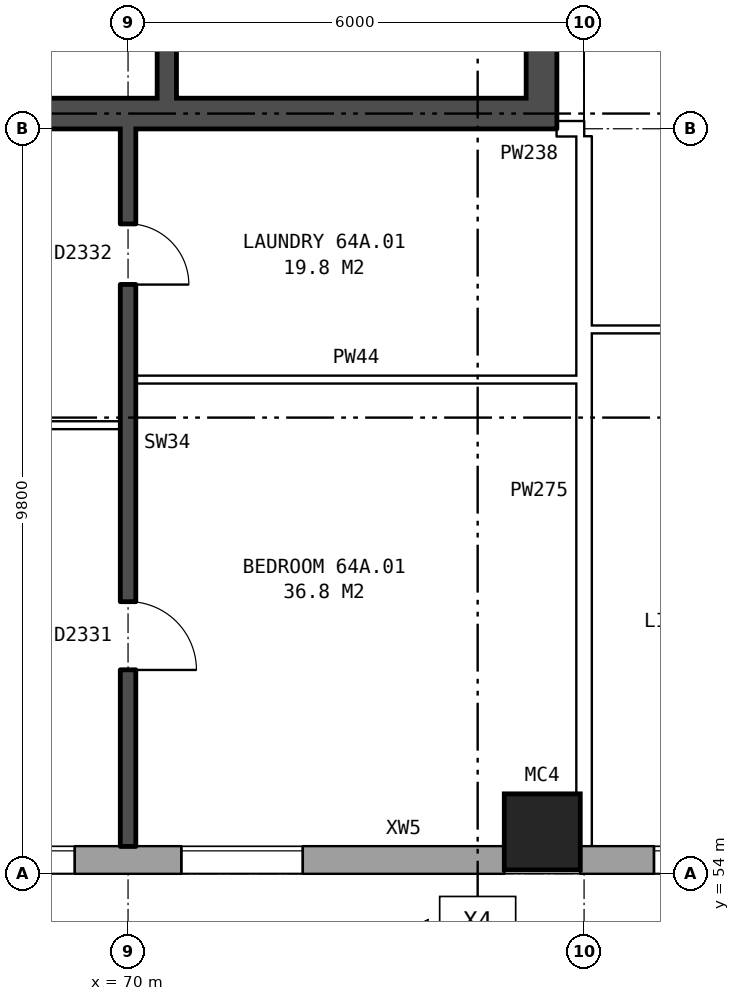
"""IFC4 building model, lengths in metres.
Left out: names, types, materials, properties, quantities, classifications, styles, units other than length and angle.
Written with IfcOpenShell. Run it as: python <this file> out.ifc"""

import sys

from ifc_helpers import new_model, si_unit, direction, frame, frame_2d, origin, origin_2d, place, context, subcontext, project, spatial, rectangle, hollow_rectangle, extrude, element, fill, save


model = new_model("IFC4")
c1 = context("Model", 3, precision=1e-05, world=origin(), true_north=direction((0.0, 1.0)))
c2 = subcontext(c1, "Body", "Model", "MODEL_VIEW")
j1 = project(units=[si_unit("LENGTHUNIT", "METRE"), si_unit("PLANEANGLEUNIT", "RADIAN")], contexts=[c1])
p1 = place(None, origin())
s1 = spatial("IfcSite", under=j1, at=p1, CompositionType="ELEMENT")
p2 = place(p1, origin())
s2 = spatial("IfcBuilding", under=s1, at=p2, CompositionType="ELEMENT")
p3 = place(p2, frame((0.0, 0.0, 227.6)))
s3 = spatial("IfcBuildingStorey", under=s2, at=p3, CompositionType="ELEMENT", Elevation=227.6)
p4 = place(p3, frame((75.45, 54.55, 0.0), z_axis=(0.0, 0.0, 1.0), x_axis=(1.0, 0.0, 0.0)))
e1 = element("IfcColumn", 1, at=p4, inside=s3, PredefinedType="COLUMN", context=c2, shape_type="SweptSolid", body=[
    extrude(hollow_rectangle(XDim=1.0, YDim=1.0, WallThickness=0.055, at=origin_2d()), origin(), (0.0, 0.0, 1.0), 3.1),
])
p5 = place(p3, frame((35.075, 54.18, 0.0), z_axis=(0.0, 0.0, 1.0), x_axis=(1.0, 0.0, 0.0)))
e2 = element("IfcWall", 2, at=p5, inside=s3, PredefinedType="STANDARD", context=c2, shape_type="SweptSolid", body=[
    extrude(rectangle(XDim=39.875, YDim=0.36, at=frame_2d((19.938, 0.0))), origin(), (0.0, 0.0, 1.0), 2.85),
])
p6 = place(p5, frame((2.625, 0.0, 0.8)))
e3 = element("IfcOpeningElement", 3, at=p6, cuts=e2, PredefinedType="OPENING", context=c2, shape_type="SweptSolid", body=[
    extrude(rectangle(XDim=1.6, YDim=1.8, at=frame_2d((0.8, 0.9))), frame((0.0, 0.19, 0.0), z_axis=(0.0, -1.0, 0.0), x_axis=(1.0, 0.0, 0.0)), (0.0, 0.0, 1.0), 0.38),
])
p7 = place(p5, frame((5.625, 0.0, 0.8)))
e4 = element("IfcOpeningElement", 4, at=p7, cuts=e2, PredefinedType="OPENING", context=c2, shape_type="SweptSolid", body=[
    extrude(rectangle(XDim=1.6, YDim=1.8, at=frame_2d((0.8, 0.9))), frame((0.0, 0.19, 0.0), z_axis=(0.0, -1.0, 0.0), x_axis=(1.0, 0.0, 0.0)), (0.0, 0.0, 1.0), 0.38),
])
p8 = place(p5, frame((8.625, 0.0, 0.8)))
e5 = element("IfcOpeningElement", 5, at=p8, cuts=e2, PredefinedType="OPENING", context=c2, shape_type="SweptSolid", body=[
    extrude(rectangle(XDim=1.6, YDim=1.8, at=frame_2d((0.8, 0.9))), frame((0.0, 0.19, 0.0), z_axis=(0.0, -1.0, 0.0), x_axis=(1.0, 0.0, 0.0)), (0.0, 0.0, 1.0), 0.38),
])
p9 = place(p5, frame((11.625, 0.0, 0.8)))
e6 = element("IfcOpeningElement", 6, at=p9, cuts=e2, PredefinedType="OPENING", context=c2, shape_type="SweptSolid", body=[
    extrude(rectangle(XDim=1.6, YDim=1.8, at=frame_2d((0.8, 0.9))), frame((0.0, 0.19, 0.0), z_axis=(0.0, -1.0, 0.0), x_axis=(1.0, 0.0, 0.0)), (0.0, 0.0, 1.0), 0.38),
])
p10 = place(p5, frame((14.625, 0.0, 0.35)))
e7 = element("IfcOpeningElement", 7, at=p10, cuts=e2, PredefinedType="OPENING", context=c2, shape_type="SweptSolid", body=[
    extrude(rectangle(XDim=0.6, YDim=0.9, at=frame_2d((0.3, 0.45))), frame((0.0, 0.19, 0.0), z_axis=(0.0, -1.0, 0.0), x_axis=(1.0, 0.0, 0.0)), (0.0, 0.0, 1.0), 0.38),
])
p11 = place(p5, frame((17.625, 0.0, 0.8)))
e8 = element("IfcOpeningElement", 8, at=p11, cuts=e2, PredefinedType="OPENING", context=c2, shape_type="SweptSolid", body=[
    extrude(rectangle(XDim=1.6, YDim=1.8, at=frame_2d((0.8, 0.9))), frame((0.0, 0.19, 0.0), z_axis=(0.0, -1.0, 0.0), x_axis=(1.0, 0.0, 0.0)), (0.0, 0.0, 1.0), 0.38),
])
p12 = place(p5, frame((20.625, 0.0, 0.8)))
e9 = element("IfcOpeningElement", 9, at=p12, cuts=e2, PredefinedType="OPENING", context=c2, shape_type="SweptSolid", body=[
    extrude(rectangle(XDim=1.6, YDim=1.8, at=frame_2d((0.8, 0.9))), frame((0.0, 0.19, 0.0), z_axis=(0.0, -1.0, 0.0), x_axis=(1.0, 0.0, 0.0)), (0.0, 0.0, 1.0), 0.38),
])
p13 = place(p5, frame((24.075, 0.0, 1.7)))
e10 = element("IfcOpeningElement", 10, at=p13, cuts=e2, PredefinedType="OPENING", context=c2, shape_type="SweptSolid", body=[
    extrude(rectangle(XDim=0.6, YDim=0.9, at=frame_2d((0.3, 0.45))), frame((0.0, 0.19, 0.0), z_axis=(0.0, -1.0, 0.0), x_axis=(1.0, 0.0, 0.0)), (0.0, 0.0, 1.0), 0.38),
])
p14 = place(p5, frame((26.625, 0.0, 0.8)))
e11 = element("IfcOpeningElement", 11, at=p14, cuts=e2, PredefinedType="OPENING", context=c2, shape_type="SweptSolid", body=[
    extrude(rectangle(XDim=1.6, YDim=1.8, at=frame_2d((0.8, 0.9))), frame((0.0, 0.19, 0.0), z_axis=(0.0, -1.0, 0.0), x_axis=(1.0, 0.0, 0.0)), (0.0, 0.0, 1.0), 0.38),
])
p15 = place(p5, frame((29.625, 0.0, 0.8)))
e12 = element("IfcOpeningElement", 12, at=p15, cuts=e2, PredefinedType="OPENING", context=c2, shape_type="SweptSolid", body=[
    extrude(rectangle(XDim=1.6, YDim=1.8, at=frame_2d((0.8, 0.9))), frame((0.0, 0.19, 0.0), z_axis=(0.0, -1.0, 0.0), x_axis=(1.0, 0.0, 0.0)), (0.0, 0.0, 1.0), 0.38),
])
p16 = place(p5, frame((32.625, 0.0, 0.8)))
e13 = element("IfcOpeningElement", 13, at=p16, cuts=e2, PredefinedType="OPENING", context=c2, shape_type="SweptSolid", body=[
    extrude(rectangle(XDim=1.6, YDim=1.8, at=frame_2d((0.8, 0.9))), frame((0.0, 0.19, 0.0), z_axis=(0.0, -1.0, 0.0), x_axis=(1.0, 0.0, 0.0)), (0.0, 0.0, 1.0), 0.38),
])
p17 = place(p5, frame((35.625, 0.0, 0.8)))
e14 = element("IfcOpeningElement", 14, at=p17, cuts=e2, PredefinedType="OPENING", context=c2, shape_type="SweptSolid", body=[
    extrude(rectangle(XDim=1.6, YDim=1.8, at=frame_2d((0.8, 0.9))), frame((0.0, 0.19, 0.0), z_axis=(0.0, -1.0, 0.0), x_axis=(1.0, 0.0, 0.0)), (0.0, 0.0, 1.0), 0.38),
])
p18 = place(p5, frame((15.525, 0.0, 0.75)))
e15 = element("IfcOpeningElement", 15, at=p18, cuts=e2, PredefinedType="OPENING", context=c2, shape_type="SweptSolid", body=[
    extrude(rectangle(XDim=1.2, YDim=1.8, at=frame_2d((0.6, 0.9))), frame((0.0, 0.19, 0.0), z_axis=(0.0, -1.0, 0.0), x_axis=(1.0, 0.0, 0.0)), (0.0, 0.0, 1.0), 0.38),
])
p19 = place(p5, frame((24.975, 0.0, 0.8)))
e16 = element("IfcOpeningElement", 16, at=p19, cuts=e2, PredefinedType="OPENING", context=c2, shape_type="SweptSolid", body=[
    extrude(rectangle(XDim=0.8, YDim=1.8, at=frame_2d((0.4, 0.9))), frame((0.0, 0.19, 0.0), z_axis=(0.0, -1.0, 0.0), x_axis=(1.0, 0.0, 0.0)), (0.0, 0.0, 1.0), 0.38),
])
p20 = place(p3, frame((75.95, 54.18, 0.0), z_axis=(0.0, 0.0, 1.0), x_axis=(1.0, 0.0, 0.0)))
e17 = element("IfcWall", 17, at=p20, inside=s3, PredefinedType="STANDARD", context=c2, shape_type="SweptSolid", body=[
    extrude(rectangle(XDim=55.1, YDim=0.36, at=frame_2d((27.55, 0.0))), origin(), (0.0, 0.0, 1.0), 2.85),
])
p21 = place(p20, frame((0.969, 0.0, 0.8)))
e18 = element("IfcOpeningElement", 18, at=p21, cuts=e17, PredefinedType="OPENING", context=c2, shape_type="SweptSolid", body=[
    extrude(rectangle(XDim=1.6, YDim=1.8, at=frame_2d((0.8, 0.9))), frame((0.0, 0.19, 0.0), z_axis=(0.0, -1.0, 0.0), x_axis=(1.0, 0.0, 0.0)), (0.0, 0.0, 1.0), 0.38),
])
p22 = place(p20, frame((4.406, 0.0, 0.8)))
e19 = element("IfcOpeningElement", 19, at=p22, cuts=e17, PredefinedType="OPENING", context=c2, shape_type="SweptSolid", body=[
    extrude(rectangle(XDim=1.6, YDim=1.8, at=frame_2d((0.8, 0.9))), frame((0.0, 0.19, 0.0), z_axis=(0.0, -1.0, 0.0), x_axis=(1.0, 0.0, 0.0)), (0.0, 0.0, 1.0), 0.38),
])
p23 = place(p20, frame((7.844, 0.0, 0.8)))
e20 = element("IfcOpeningElement", 20, at=p23, cuts=e17, PredefinedType="OPENING", context=c2, shape_type="SweptSolid", body=[
    extrude(rectangle(XDim=1.6, YDim=1.8, at=frame_2d((0.8, 0.9))), frame((0.0, 0.19, 0.0), z_axis=(0.0, -1.0, 0.0), x_axis=(1.0, 0.0, 0.0)), (0.0, 0.0, 1.0), 0.38),
])
p24 = place(p20, frame((11.281, 0.0, 0.8)))
e21 = element("IfcOpeningElement", 21, at=p24, cuts=e17, PredefinedType="OPENING", context=c2, shape_type="SweptSolid", body=[
    extrude(rectangle(XDim=1.6, YDim=1.8, at=frame_2d((0.8, 0.9))), frame((0.0, 0.19, 0.0), z_axis=(0.0, -1.0, 0.0), x_axis=(1.0, 0.0, 0.0)), (0.0, 0.0, 1.0), 0.38),
])
p25 = place(p20, frame((14.719, 0.0, 0.8)))
e22 = element("IfcOpeningElement", 22, at=p25, cuts=e17, PredefinedType="OPENING", context=c2, shape_type="SweptSolid", body=[
    extrude(rectangle(XDim=1.6, YDim=1.8, at=frame_2d((0.8, 0.9))), frame((0.0, 0.19, 0.0), z_axis=(0.0, -1.0, 0.0), x_axis=(1.0, 0.0, 0.0)), (0.0, 0.0, 1.0), 0.38),
])
p26 = place(p20, frame((18.156, 0.0, 0.8)))
e23 = element("IfcOpeningElement", 23, at=p26, cuts=e17, PredefinedType="OPENING", context=c2, shape_type="SweptSolid", body=[
    extrude(rectangle(XDim=1.6, YDim=1.8, at=frame_2d((0.8, 0.9))), frame((0.0, 0.19, 0.0), z_axis=(0.0, -1.0, 0.0), x_axis=(1.0, 0.0, 0.0)), (0.0, 0.0, 1.0), 0.38),
])
p27 = place(p20, frame((21.594, 0.0, 0.8)))
e24 = element("IfcOpeningElement", 24, at=p27, cuts=e17, PredefinedType="OPENING", context=c2, shape_type="SweptSolid", body=[
    extrude(rectangle(XDim=1.6, YDim=1.8, at=frame_2d((0.8, 0.9))), frame((0.0, 0.19, 0.0), z_axis=(0.0, -1.0, 0.0), x_axis=(1.0, 0.0, 0.0)), (0.0, 0.0, 1.0), 0.38),
])
p28 = place(p20, frame((25.031, 0.0, 0.8)))
e25 = element("IfcOpeningElement", 25, at=p28, cuts=e17, PredefinedType="OPENING", context=c2, shape_type="SweptSolid", body=[
    extrude(rectangle(XDim=1.6, YDim=1.8, at=frame_2d((0.8, 0.9))), frame((0.0, 0.19, 0.0), z_axis=(0.0, -1.0, 0.0), x_axis=(1.0, 0.0, 0.0)), (0.0, 0.0, 1.0), 0.38),
])
p29 = place(p20, frame((28.469, 0.0, 0.8)))
e26 = element("IfcOpeningElement", 26, at=p29, cuts=e17, PredefinedType="OPENING", context=c2, shape_type="SweptSolid", body=[
    extrude(rectangle(XDim=1.6, YDim=1.8, at=frame_2d((0.8, 0.9))), frame((0.0, 0.19, 0.0), z_axis=(0.0, -1.0, 0.0), x_axis=(1.0, 0.0, 0.0)), (0.0, 0.0, 1.0), 0.38),
])
p30 = place(p20, frame((31.906, 0.0, 0.8)))
e27 = element("IfcOpeningElement", 27, at=p30, cuts=e17, PredefinedType="OPENING", context=c2, shape_type="SweptSolid", body=[
    extrude(rectangle(XDim=1.6, YDim=1.8, at=frame_2d((0.8, 0.9))), frame((0.0, 0.19, 0.0), z_axis=(0.0, -1.0, 0.0), x_axis=(1.0, 0.0, 0.0)), (0.0, 0.0, 1.0), 0.38),
])
p31 = place(p20, frame((35.344, 0.0, 0.8)))
e28 = element("IfcOpeningElement", 28, at=p31, cuts=e17, PredefinedType="OPENING", context=c2, shape_type="SweptSolid", body=[
    extrude(rectangle(XDim=1.6, YDim=1.8, at=frame_2d((0.8, 0.9))), frame((0.0, 0.19, 0.0), z_axis=(0.0, -1.0, 0.0), x_axis=(1.0, 0.0, 0.0)), (0.0, 0.0, 1.0), 0.38),
])
p32 = place(p20, frame((38.781, 0.0, 0.8)))
e29 = element("IfcOpeningElement", 29, at=p32, cuts=e17, PredefinedType="OPENING", context=c2, shape_type="SweptSolid", body=[
    extrude(rectangle(XDim=1.6, YDim=1.8, at=frame_2d((0.8, 0.9))), frame((0.0, 0.19, 0.0), z_axis=(0.0, -1.0, 0.0), x_axis=(1.0, 0.0, 0.0)), (0.0, 0.0, 1.0), 0.38),
])
p33 = place(p20, frame((42.219, 0.0, 0.8)))
e30 = element("IfcOpeningElement", 30, at=p33, cuts=e17, PredefinedType="OPENING", context=c2, shape_type="SweptSolid", body=[
    extrude(rectangle(XDim=1.6, YDim=1.8, at=frame_2d((0.8, 0.9))), frame((0.0, 0.19, 0.0), z_axis=(0.0, -1.0, 0.0), x_axis=(1.0, 0.0, 0.0)), (0.0, 0.0, 1.0), 0.38),
])
p34 = place(p20, frame((45.656, 0.0, 0.8)))
e31 = element("IfcOpeningElement", 31, at=p34, cuts=e17, PredefinedType="OPENING", context=c2, shape_type="SweptSolid", body=[
    extrude(rectangle(XDim=1.6, YDim=1.8, at=frame_2d((0.8, 0.9))), frame((0.0, 0.19, 0.0), z_axis=(0.0, -1.0, 0.0), x_axis=(1.0, 0.0, 0.0)), (0.0, 0.0, 1.0), 0.38),
])
p35 = place(p20, frame((49.094, 0.0, 0.8)))
e32 = element("IfcOpeningElement", 32, at=p35, cuts=e17, PredefinedType="OPENING", context=c2, shape_type="SweptSolid", body=[
    extrude(rectangle(XDim=1.6, YDim=1.8, at=frame_2d((0.8, 0.9))), frame((0.0, 0.19, 0.0), z_axis=(0.0, -1.0, 0.0), x_axis=(1.0, 0.0, 0.0)), (0.0, 0.0, 1.0), 0.38),
])
p36 = place(p20, frame((52.531, 0.0, 0.8)))
e33 = element("IfcOpeningElement", 33, at=p36, cuts=e17, PredefinedType="OPENING", context=c2, shape_type="SweptSolid", body=[
    extrude(rectangle(XDim=1.6, YDim=1.8, at=frame_2d((0.8, 0.9))), frame((0.0, 0.19, 0.0), z_axis=(0.0, -1.0, 0.0), x_axis=(1.0, 0.0, 0.0)), (0.0, 0.0, 1.0), 0.38),
])
p37 = place(p3, frame((75.44, 63.8, 0.0), z_axis=(0.0, 0.0, 1.0), x_axis=(0.0, 1.0, 0.0)))
e34 = element("IfcWall", 34, at=p37, inside=s3, PredefinedType="SHEAR", context=c2, shape_type="SweptSolid", body=[
    extrude(rectangle(XDim=12.4, YDim=0.4, at=frame_2d((6.2, 0.0))), origin(), (0.0, 0.0, 1.0), 2.85),
])
p38 = place(p37, frame((9.8, 0.0, 0.0)))
e35 = element("IfcOpeningElement", 35, at=p38, cuts=e34, PredefinedType="OPENING", context=c2, shape_type="SweptSolid", body=[
    extrude(rectangle(XDim=1.1, YDim=2.1, at=frame_2d((0.55, 1.05))), frame((0.0, 0.21, 0.0), z_axis=(0.0, -1.0, 0.0), x_axis=(1.0, 0.0, 0.0)), (0.0, 0.0, 1.0), 0.42),
])
p39 = place(p3, frame((67.04, 64.0, 0.0), z_axis=(0.0, 0.0, 1.0), x_axis=(1.0, 0.0, 0.0)))
e36 = element("IfcWall", 36, at=p39, inside=s3, PredefinedType="SHEAR", context=c2, shape_type="SweptSolid", body=[
    extrude(rectangle(XDim=8.2, YDim=0.4, at=frame_2d((4.1, 0.0))), origin(), (0.0, 0.0, 1.0), 2.85),
])
p40 = place(p3, frame((70.51, 64.2, 0.0), z_axis=(0.0, 0.0, 1.0), x_axis=(0.0, 1.0, 0.0)))
e37 = element("IfcWall", 37, at=p40, inside=s3, PredefinedType="SHEAR", context=c2, shape_type="SweptSolid", body=[
    extrude(rectangle(XDim=2.525, YDim=0.25, at=frame_2d((1.263, 0.0))), origin(), (0.0, 0.0, 1.0), 2.85),
])
p41 = place(p3, frame((64.1, 59.9, 0.0), z_axis=(0.0, 0.0, 1.0), x_axis=(1.0, 0.0, 0.0)))
e38 = element("IfcWall", 38, at=p41, inside=s3, PredefinedType="PARTITIONING", context=c2, shape_type="SweptSolid", body=[
    extrude(rectangle(XDim=5.8, YDim=0.1, at=frame_2d((2.9, 0.0))), origin(), (0.0, 0.0, 1.0), 2.85),
])
p42 = place(p41, frame((3.6, 0.0, 0.0)))
e39 = element("IfcOpeningElement", 39, at=p42, cuts=e38, PredefinedType="OPENING", context=c2, shape_type="SweptSolid", body=[
    extrude(rectangle(XDim=0.9, YDim=2.1, at=frame_2d((0.45, 1.05))), frame((0.0, 0.06, 0.0), z_axis=(0.0, -1.0, 0.0), x_axis=(1.0, 0.0, 0.0)), (0.0, 0.0, 1.0), 0.12),
])
p43 = place(p41, frame((0.7, 0.0, 0.0)))
e40 = element("IfcOpeningElement", 40, at=p43, cuts=e38, PredefinedType="OPENING", context=c2, shape_type="SweptSolid", body=[
    extrude(rectangle(XDim=0.9, YDim=2.1, at=frame_2d((0.45, 1.05))), frame((0.0, 0.06, 0.0), z_axis=(0.0, -1.0, 0.0), x_axis=(1.0, 0.0, 0.0)), (0.0, 0.0, 1.0), 0.12),
])
p44 = place(p3, frame((70.1, 60.5, 0.0), z_axis=(0.0, 0.0, 1.0), x_axis=(1.0, 0.0, 0.0)))
e41 = element("IfcWall", 41, at=p44, inside=s3, PredefinedType="PARTITIONING", context=c2, shape_type="SweptSolid", body=[
    extrude(rectangle(XDim=5.8, YDim=0.1, at=frame_2d((2.9, 0.0))), origin(), (0.0, 0.0, 1.0), 2.85),
])
p45 = place(p3, frame((76.1, 61.16, 0.0), z_axis=(0.0, 0.0, 1.0), x_axis=(1.0, 0.0, 0.0)))
e42 = element("IfcWall", 42, at=p45, inside=s3, PredefinedType="PARTITIONING", context=c2, shape_type="SweptSolid", body=[
    extrude(rectangle(XDim=3.338, YDim=0.1, at=frame_2d((1.669, 0.0))), origin(), (0.0, 0.0, 1.0), 2.85),
])
p46 = place(p45, frame((1.219, 0.0, 0.0)))
e43 = element("IfcOpeningElement", 43, at=p46, cuts=e42, PredefinedType="OPENING", context=c2, shape_type="SweptSolid", body=[
    extrude(rectangle(XDim=0.9, YDim=2.1, at=frame_2d((0.45, 1.05))), frame((0.0, 0.06, 0.0), z_axis=(0.0, -1.0, 0.0), x_axis=(1.0, 0.0, 0.0)), (0.0, 0.0, 1.0), 0.12),
])
p47 = place(p3, frame((75.64, 63.8, 0.0), z_axis=(0.0, 0.0, 1.0), x_axis=(1.0, 0.0, 0.0)))
e44 = element("IfcWall", 44, at=p47, inside=s3, PredefinedType="PARTITIONING", context=c2, shape_type="SweptSolid", body=[
    extrude(rectangle(XDim=0.36, YDim=0.2, at=frame_2d((0.18, 0.0))), origin(), (0.0, 0.0, 1.0), 2.85),
])
p48 = place(p3, frame((70.0, 54.36, 0.0), z_axis=(0.0, 0.0, 1.0), x_axis=(0.0, 1.0, 0.0)))
e45 = element("IfcWall", 45, at=p48, inside=s3, PredefinedType="SOLIDWALL", context=c2, shape_type="SweptSolid", body=[
    extrude(rectangle(XDim=9.44, YDim=0.2, at=frame_2d((4.72, 0.0))), origin(), (0.0, 0.0, 1.0), 2.85),
])
p49 = place(p48, frame((2.32, 0.0, 0.0)))
e46 = element("IfcOpeningElement", 46, at=p49, cuts=e45, PredefinedType="OPENING", context=c2, shape_type="SweptSolid", body=[
    extrude(rectangle(XDim=0.9, YDim=2.1, at=frame_2d((0.45, 1.05))), frame((0.0, 0.11, 0.0), z_axis=(0.0, -1.0, 0.0), x_axis=(1.0, 0.0, 0.0)), (0.0, 0.0, 1.0), 0.22),
])
p50 = place(p48, frame((7.39, 0.0, 0.0)))
e47 = element("IfcOpeningElement", 47, at=p50, cuts=e45, PredefinedType="OPENING", context=c2, shape_type="SweptSolid", body=[
    extrude(rectangle(XDim=0.8, YDim=2.1, at=frame_2d((0.4, 1.05))), frame((0.0, 0.11, 0.0), z_axis=(0.0, -1.0, 0.0), x_axis=(1.0, 0.0, 0.0)), (0.0, 0.0, 1.0), 0.22),
])
p51 = place(p3, frame((76.0, 54.36, 0.0), z_axis=(0.0, 0.0, 1.0), x_axis=(0.0, 1.0, 0.0)))
e48 = element("IfcWall", 48, at=p51, inside=s3, PredefinedType="PARTITIONING", context=c2, shape_type="SweptSolid", body=[
    extrude(rectangle(XDim=9.34, YDim=0.2, at=frame_2d((4.67, 0.0))), origin(), (0.0, 0.0, 1.0), 2.85),
])
p52 = place(p16, origin())
e49 = element("IfcWindow", 49, at=p52, inside=s3, PartitioningType="SINGLE_PANEL", PredefinedType="WINDOW", context=c2, shape_type="SweptSolid", body=[
    extrude(rectangle(XDim=1.6, YDim=1.8, at=frame_2d((0.8, 0.9))), frame((0.0, 0.15, 0.0), z_axis=(0.0, -1.0, 0.0), x_axis=(1.0, 0.0, 0.0)), (0.0, 0.0, 1.0), 0.06),
])
fill(e13, e49)
p53 = place(p17, origin())
e50 = element("IfcWindow", 50, at=p53, inside=s3, PartitioningType="SINGLE_PANEL", PredefinedType="WINDOW", context=c2, shape_type="SweptSolid", body=[
    extrude(rectangle(XDim=1.6, YDim=1.8, at=frame_2d((0.8, 0.9))), frame((0.0, 0.15, 0.0), z_axis=(0.0, -1.0, 0.0), x_axis=(1.0, 0.0, 0.0)), (0.0, 0.0, 1.0), 0.06),
])
fill(e14, e50)
p54 = place(p21, origin())
e51 = element("IfcWindow", 51, at=p54, inside=s3, PartitioningType="SINGLE_PANEL", PredefinedType="WINDOW", context=c2, shape_type="SweptSolid", body=[
    extrude(rectangle(XDim=1.6, YDim=1.8, at=frame_2d((0.8, 0.9))), frame((0.0, 0.15, 0.0), z_axis=(0.0, -1.0, 0.0), x_axis=(1.0, 0.0, 0.0)), (0.0, 0.0, 1.0), 0.06),
])
fill(e18, e51)
p55 = place(p49, frame((0.9, 0.0, 0.0), z_axis=(0.0, 0.0, 1.0), x_axis=(-1.0, 0.0, 0.0)))
e52 = element("IfcDoor", 52, at=p55, inside=s3, OperationType="SINGLE_SWING_RIGHT", PredefinedType="DOOR", context=c2, shape_type="SweptSolid", body=[
    extrude(rectangle(XDim=0.9, YDim=2.1, at=frame_2d((0.45, 1.05))), frame((0.0, 0.025, 0.0), z_axis=(0.0, -1.0, 0.0), x_axis=(1.0, 0.0, 0.0)), (0.0, 0.0, 1.0), 0.05),
])
fill(e46, e52)
p56 = place(p50, frame((0.8, 0.0, 0.0), z_axis=(0.0, 0.0, 1.0), x_axis=(-1.0, 0.0, 0.0)))
e53 = element("IfcDoor", 53, at=p56, inside=s3, OperationType="SINGLE_SWING_RIGHT", PredefinedType="DOOR", context=c2, shape_type="SweptSolid", body=[
    extrude(rectangle(XDim=0.8, YDim=2.1, at=frame_2d((0.4, 1.05))), frame((0.0, 0.025, 0.0), z_axis=(0.0, -1.0, 0.0), x_axis=(1.0, 0.0, 0.0)), (0.0, 0.0, 1.0), 0.05),
])
fill(e47, e53)
save(model, sys.argv[1])
